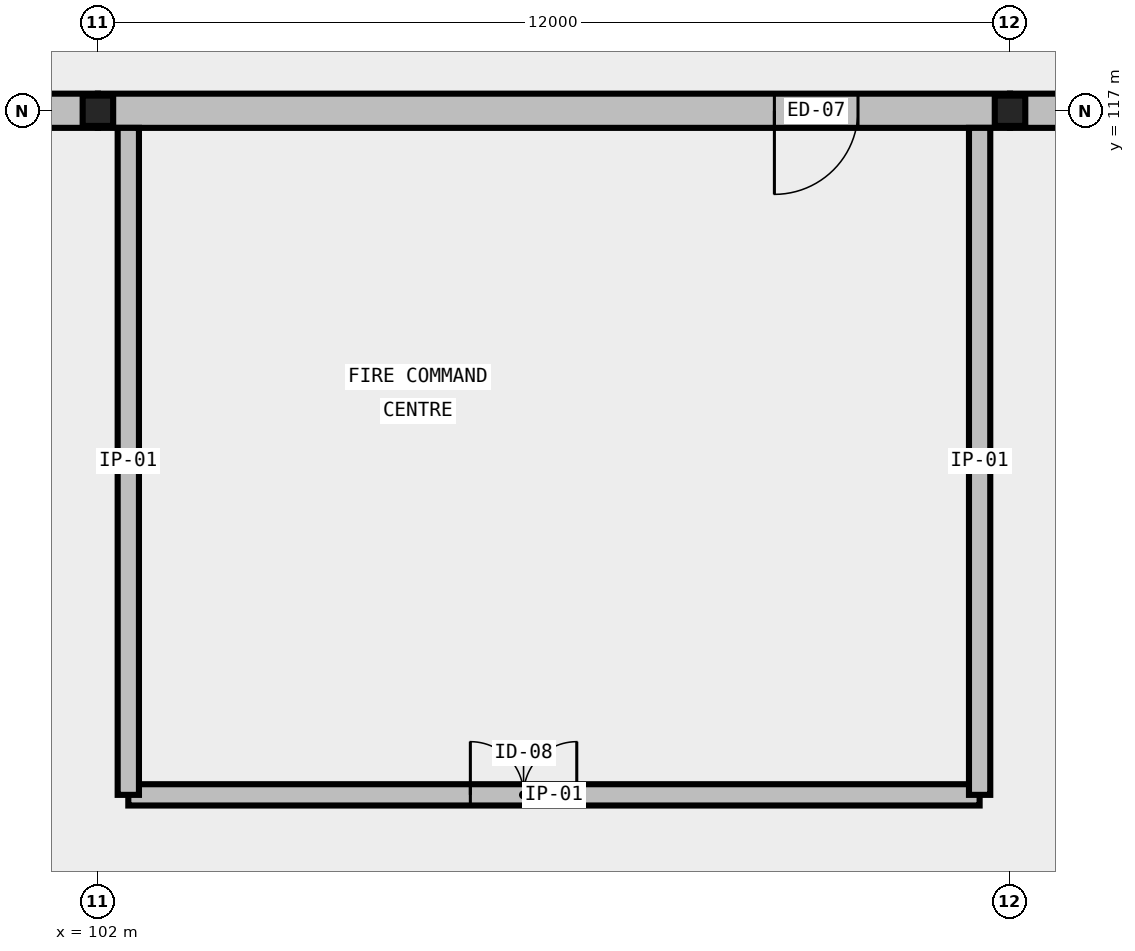
"""IFC4 building model, lengths in metres.
Left out: names, types, materials, properties, quantities, classifications, styles, units other than length and angle.
Written with IfcOpenShell. Run it as: python <this file> out.ifc"""

import sys

from ifc_helpers import new_model, si_unit, direction, frame, frame_2d, origin, origin_2d, place, context, subcontext, project, spatial, rectangle, i_section, extrude, element, fill, save


model = new_model("IFC4")
c1 = context("Model", 3, precision=1e-05, world=origin(), true_north=direction((0.0, 1.0)))
c2 = subcontext(c1, "Body", "Model", "MODEL_VIEW")
j1 = project(units=[si_unit("LENGTHUNIT", "METRE"), si_unit("PLANEANGLEUNIT", "RADIAN")], contexts=[c1])
p1 = place(None, origin())
s1 = spatial("IfcSite", under=j1, at=p1, CompositionType="ELEMENT")
p2 = place(p1, origin())
s2 = spatial("IfcBuilding", under=s1, at=p2, CompositionType="ELEMENT")
p3 = place(p2, origin())
s3 = spatial("IfcBuildingStorey", under=s2, at=p3, CompositionType="ELEMENT", Elevation=0.0)
for number, where, z_axis, x_axis in (
    (1, (102.0, 117.0, 0.0), (0.0, 0.0, 1.0), (1.0, 0.0, 0.0)),
    (2, (114.0, 117.0, 0.0), (0.0, 0.0, 1.0), (1.0, 0.0, 0.0)),
):
    element("IfcColumn", number, at=place(p3, frame(where, z_axis=z_axis, x_axis=x_axis)), inside=s3, PredefinedType="COLUMN", context=c2, shape_type="SweptSolid", body=[
        extrude(i_section(OverallWidth=0.401, OverallDepth=0.399, WebThickness=0.025, FlangeThickness=0.04, FilletRadius=0.031, at=origin_2d()), origin(), (0.0, 0.0, 1.0), 6.0),
    ])
p4 = place(p3, frame((102.0, 117.0, 0.0), z_axis=(0.0, 0.0, 1.0), x_axis=(-1.0, 0.0, 0.0)))
e3 = element("IfcWall", 3, at=p4, inside=s3, PredefinedType="STANDARD", context=c2, shape_type="SweptSolid", body=[
    extrude(rectangle(XDim=6.0, YDim=0.45, at=frame_2d((3.0, 0.0))), origin(), (0.0, 0.0, 1.0), 4.676),
])
p5 = place(p3, frame((114.0, 117.0, 0.0), z_axis=(0.0, 0.0, 1.0), x_axis=(-1.0, 0.0, 0.0)))
e4 = element("IfcWall", 4, at=p5, inside=s3, PredefinedType="STANDARD", context=c2, shape_type="SweptSolid", body=[
    extrude(rectangle(XDim=12.0, YDim=0.45, at=frame_2d((6.0, 0.0))), origin(), (0.0, 0.0, 1.0), 4.676),
])
p6 = place(p5, frame((2.0, 0.0, 0.0)))
e5 = element("IfcOpeningElement", 5, at=p6, cuts=e4, PredefinedType="OPENING", context=c2, shape_type="SweptSolid", body=[
    extrude(rectangle(XDim=1.1, YDim=2.2, at=frame_2d((0.55, 1.1))), frame((0.0, 0.24, 0.0), z_axis=(0.0, -1.0, 0.0), x_axis=(1.0, 0.0, 0.0)), (0.0, 0.0, 1.0), 0.48),
])
p7 = place(p3, frame((126.0, 117.0, 0.0), z_axis=(0.0, 0.0, 1.0), x_axis=(-1.0, 0.0, 0.0)))
e6 = element("IfcWall", 6, at=p7, inside=s3, PredefinedType="STANDARD", context=c2, shape_type="SweptSolid", body=[
    extrude(rectangle(XDim=12.0, YDim=0.45, at=frame_2d((6.0, 0.0))), origin(), (0.0, 0.0, 1.0), 4.676),
])
p8 = place(p7, frame((1.5, 0.0, 0.0)))
e7 = element("IfcOpeningElement", 7, at=p8, cuts=e6, PredefinedType="OPENING", context=c2, shape_type="SweptSolid", body=[
    extrude(rectangle(XDim=2.5, YDim=2.55, at=frame_2d((1.25, 1.275))), frame((0.0, 0.24, 0.0), z_axis=(0.0, -1.0, 0.0), x_axis=(1.0, 0.0, 0.0)), (0.0, 0.0, 1.0), 0.48),
])
p9 = place(p7, frame((7.6, 0.0, 0.0)))
e8 = element("IfcOpeningElement", 8, at=p9, cuts=e6, PredefinedType="OPENING", context=c2, shape_type="SweptSolid", body=[
    extrude(rectangle(XDim=2.4, YDim=2.5, at=frame_2d((1.2, 1.25))), frame((0.0, 0.24, 0.0), z_axis=(0.0, -1.0, 0.0), x_axis=(1.0, 0.0, 0.0)), (0.0, 0.0, 1.0), 0.48),
])
p10 = place(p3, frame((102.4, 108.0, 0.0), z_axis=(0.0, 0.0, 1.0), x_axis=(1.0, 0.0, 0.0)))
e9 = element("IfcWall", 9, at=p10, inside=s3, PredefinedType="PARTITIONING", context=c2, shape_type="SweptSolid", body=[
    extrude(rectangle(XDim=11.2, YDim=0.28, at=frame_2d((5.6, 0.0))), origin(), (0.0, 0.0, 1.0), 5.68),
])
p11 = place(p10, frame((4.5, 0.0, 0.0)))
e10 = element("IfcOpeningElement", 10, at=p11, cuts=e9, PredefinedType="OPENING", context=c2, shape_type="SweptSolid", body=[
    extrude(rectangle(XDim=1.4, YDim=2.2, at=frame_2d((0.7, 1.1))), frame((0.0, 0.155, 0.0), z_axis=(0.0, -1.0, 0.0), x_axis=(1.0, 0.0, 0.0)), (0.0, 0.0, 1.0), 0.31),
])
for number, where, z_axis, x_axis in (
    (11, (113.6, 108.0, 0.0), (0.0, 0.0, 1.0), (0.0, 1.0, 0.0)),
    (12, (102.4, 116.775, 0.0), (0.0, 0.0, 1.0), (0.0, -1.0, 0.0)),
):
    element("IfcWall", number, at=place(p3, frame(where, z_axis=z_axis, x_axis=x_axis)), inside=s3, PredefinedType="PARTITIONING", context=c2, shape_type="SweptSolid", body=[
        extrude(rectangle(XDim=8.775, YDim=0.28, at=frame_2d((4.387, 0.0))), origin(), (0.0, 0.0, 1.0), 5.68),
    ])
p12 = place(p6, origin())
e13 = element("IfcDoor", 13, at=p12, inside=s3, OperationType="SINGLE_SWING_RIGHT", PredefinedType="DOOR", context=c2, shape_type="SweptSolid", body=[
    extrude(rectangle(XDim=1.1, YDim=2.2, at=frame_2d((0.55, 1.1))), frame((0.0, 0.025, 0.0), z_axis=(0.0, -1.0, 0.0), x_axis=(1.0, 0.0, 0.0)), (0.0, 0.0, 1.0), 0.05),
])
fill(e5, e13)
p13 = place(p11, origin())
e14 = element("IfcDoor", 14, at=p13, inside=s3, OperationType="DOUBLE_DOOR_SINGLE_SWING", PredefinedType="DOOR", context=c2, shape_type="SweptSolid", body=[
    extrude(rectangle(XDim=1.4, YDim=2.2, at=frame_2d((0.7, 1.1))), frame((0.0, 0.025, 0.0), z_axis=(0.0, -1.0, 0.0), x_axis=(1.0, 0.0, 0.0)), (0.0, 0.0, 1.0), 0.05),
])
fill(e10, e14)
save(model, sys.argv[1])
